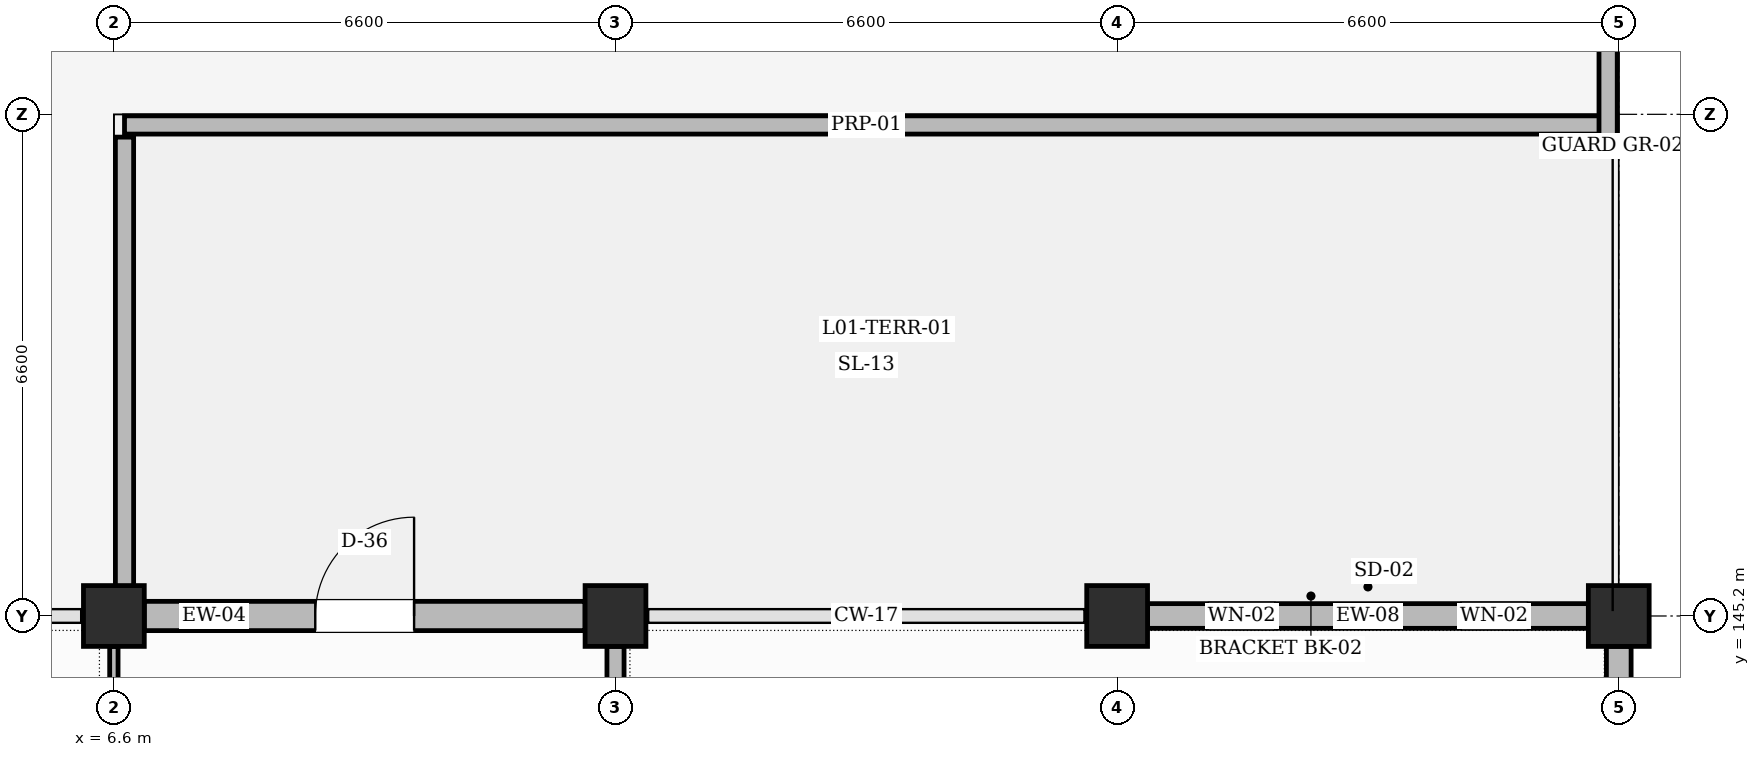
"""IFC4 building model, lengths in metres.
Left out: names, types, materials, properties, quantities, classifications, styles, units other than length and angle.
Written with IfcOpenShell. Run it as: python <this file> out.ifc"""

import sys

from ifc_helpers import new_model, si_unit, direction, frame, frame_2d, origin, origin_2d, place, context, subcontext, project, spatial, rectangle, extrude, element, fill, save


model = new_model("IFC4")
c1 = context("Model", 3, precision=1e-05, world=origin(), true_north=direction((0.0, 1.0)))
c2 = subcontext(c1, "Body", "Model", "MODEL_VIEW")
j1 = project(units=[si_unit("LENGTHUNIT", "METRE"), si_unit("PLANEANGLEUNIT", "RADIAN")], contexts=[c1])
p1 = place(None, origin())
s1 = spatial("IfcSite", under=j1, at=p1, CompositionType="ELEMENT")
p2 = place(p1, origin())
s2 = spatial("IfcBuilding", under=s1, at=p2, CompositionType="ELEMENT")
p3 = place(p2, frame((0.0, 0.0, 5.4)))
s3 = spatial("IfcBuildingStorey", under=s2, at=p3, CompositionType="ELEMENT", Elevation=5.4)
for number, where, z_axis, x_axis in (
    (1, (6.6, 145.2, 0.0), (0.0, 0.0, 1.0), (1.0, 0.0, 0.0)),
    (2, (13.2, 145.2, 0.0), (0.0, 0.0, 1.0), (1.0, 0.0, 0.0)),
    (3, (19.8, 145.2, 0.0), (0.0, 0.0, 1.0), (1.0, 0.0, 0.0)),
    (4, (26.4, 145.2, 0.0), (0.0, 0.0, 1.0), (1.0, 0.0, 0.0)),
):
    element("IfcColumn", number, at=place(p3, frame(where, z_axis=z_axis, x_axis=x_axis)), inside=s3, PredefinedType="COLUMN", context=c2, shape_type="SweptSolid", body=[
        extrude(rectangle(XDim=0.8, YDim=0.8, at=origin_2d()), origin(), (0.0, 0.0, 1.0), 4.8),
    ])
p4 = place(p3, frame((7.0, 145.2, 0.0), z_axis=(0.0, 0.0, 1.0), x_axis=(1.0, 0.0, 0.0)))
e5 = element("IfcWall", 5, at=p4, inside=s3, PredefinedType="SOLIDWALL", context=c2, shape_type="SweptSolid", body=[
    extrude(rectangle(XDim=5.8, YDim=0.385, at=frame_2d((2.9, 0.0))), origin(), (0.0, 0.0, 1.0), 3.85),
])
p5 = place(p4, frame((2.25, 0.0, 0.0)))
e6 = element("IfcOpeningElement", 6, at=p5, cuts=e5, PredefinedType="OPENING", context=c2, shape_type="SweptSolid", body=[
    extrude(rectangle(XDim=1.3, YDim=2.2, at=frame_2d((0.65, 1.1))), frame((0.0, 0.202, 0.0), z_axis=(0.0, -1.0, 0.0), x_axis=(1.0, 0.0, 0.0)), (0.0, 0.0, 1.0), 0.405),
])
p6 = place(p3, frame((20.2, 145.2, 0.0), z_axis=(0.0, 0.0, 1.0), x_axis=(1.0, 0.0, 0.0)))
e7 = element("IfcWall", 7, at=p6, inside=s3, PredefinedType="SOLIDWALL", context=c2, shape_type="SweptSolid", body=[
    extrude(rectangle(XDim=5.8, YDim=0.325, at=frame_2d((2.9, 0.0))), origin(), (0.0, 0.0, 1.0), 3.85),
])
p7 = place(p6, frame((0.8, 0.0, 0.95)))
e8 = element("IfcOpeningElement", 8, at=p7, cuts=e7, PredefinedType="OPENING", context=c2, shape_type="SweptSolid", body=[
    extrude(rectangle(XDim=0.88, YDim=1.52, at=frame_2d((0.44, 0.76))), frame((0.0, 0.172, 0.0), z_axis=(0.0, -1.0, 0.0), x_axis=(1.0, 0.0, 0.0)), (0.0, 0.0, 1.0), 0.345),
])
p8 = place(p6, frame((4.12, 0.0, 0.95)))
e9 = element("IfcOpeningElement", 9, at=p8, cuts=e7, PredefinedType="OPENING", context=c2, shape_type="SweptSolid", body=[
    extrude(rectangle(XDim=0.88, YDim=1.52, at=frame_2d((0.44, 0.76))), frame((0.0, 0.172, 0.0), z_axis=(0.0, -1.0, 0.0), x_axis=(1.0, 0.0, 0.0)), (0.0, 0.0, 1.0), 0.345),
])
p9 = place(p3, frame((26.4, 138.9, 0.0), z_axis=(0.0, 0.0, 1.0), x_axis=(0.0, 1.0, 0.0)))
e10 = element("IfcWall", 10, at=p9, inside=s3, PredefinedType="SOLIDWALL", context=c2, shape_type="SweptSolid", body=[
    extrude(rectangle(XDim=5.9, YDim=0.325, at=frame_2d((2.95, 0.0))), origin(), (0.0, 0.0, 1.0), 3.85),
])
p10 = place(p9, frame((0.8, 0.0, 0.95)))
e11 = element("IfcOpeningElement", 11, at=p10, cuts=e10, PredefinedType="OPENING", context=c2, shape_type="SweptSolid", body=[
    extrude(rectangle(XDim=0.88, YDim=1.74, at=frame_2d((0.44, 0.87))), frame((0.0, 0.172, 0.0), z_axis=(0.0, -1.0, 0.0), x_axis=(1.0, 0.0, 0.0)), (0.0, 0.0, 1.0), 0.345),
])
p11 = place(p9, frame((4.22, 0.0, 0.95)))
e12 = element("IfcOpeningElement", 12, at=p11, cuts=e10, PredefinedType="OPENING", context=c2, shape_type="SweptSolid", body=[
    extrude(rectangle(XDim=0.88, YDim=1.74, at=frame_2d((0.44, 0.87))), frame((0.0, 0.172, 0.0), z_axis=(0.0, -1.0, 0.0), x_axis=(1.0, 0.0, 0.0)), (0.0, 0.0, 1.0), 0.345),
])
p12 = place(p3, frame((6.74, 151.66, 0.0), z_axis=(0.0, 0.0, 1.0), x_axis=(1.0, 0.0, 0.0)))
e13 = element("IfcWall", 13, at=p12, inside=s3, PredefinedType="PARAPET", context=c2, shape_type="SweptSolid", body=[
    extrude(rectangle(XDim=6.32, YDim=0.24, at=frame_2d((3.16, 0.0))), origin(), (0.0, 0.0, 1.0), 1.15),
])
p13 = place(p3, frame((6.74, 145.5, 0.0), z_axis=(0.0, 0.0, 1.0), x_axis=(0.0, 1.0, 0.0)))
e14 = element("IfcWall", 14, at=p13, inside=s3, PredefinedType="PARAPET", context=c2, shape_type="SweptSolid", body=[
    extrude(rectangle(XDim=6.0, YDim=0.24, at=frame_2d((3.0, 0.0))), origin(), (0.0, 0.0, 1.0), 1.15),
])
p14 = place(p3, frame((13.34, 151.66, 0.0), z_axis=(0.0, 0.0, 1.0), x_axis=(1.0, 0.0, 0.0)))
e15 = element("IfcWall", 15, at=p14, inside=s3, PredefinedType="PARAPET", context=c2, shape_type="SweptSolid", body=[
    extrude(rectangle(XDim=6.32, YDim=0.24, at=frame_2d((3.16, 0.0))), origin(), (0.0, 0.0, 1.0), 1.15),
])
p15 = place(p3, frame((19.94, 151.66, 0.0), z_axis=(0.0, 0.0, 1.0), x_axis=(1.0, 0.0, 0.0)))
e16 = element("IfcWall", 16, at=p15, inside=s3, PredefinedType="PARAPET", context=c2, shape_type="SweptSolid", body=[
    extrude(rectangle(XDim=6.32, YDim=0.24, at=frame_2d((3.16, 0.0))), origin(), (0.0, 0.0, 1.0), 1.15),
])
p16 = place(p3, frame((26.26, 151.36, 0.0), z_axis=(0.0, 0.0, 1.0), x_axis=(0.0, 1.0, 0.0)))
e17 = element("IfcWall", 17, at=p16, inside=s3, PredefinedType="PARAPET", context=c2, shape_type="SweptSolid", body=[
    extrude(rectangle(XDim=0.16, YDim=0.24, at=frame_2d((0.08, 0.0))), origin(), (0.0, 0.0, 1.0), 1.15),
])
p17 = place(p3, frame((26.26, 152.1, 0.0), z_axis=(0.0, 0.0, 1.0), x_axis=(0.0, 1.0, 0.0)))
e18 = element("IfcWall", 18, at=p17, inside=s3, PredefinedType="PARAPET", context=c2, shape_type="SweptSolid", body=[
    extrude(rectangle(XDim=6.0, YDim=0.24, at=frame_2d((3.0, 0.0))), origin(), (0.0, 0.0, 1.0), 1.15),
])
p18 = place(p3, frame((6.6, 138.9, 0.0), z_axis=(0.0, 0.0, 1.0), x_axis=(0.0, 1.0, 0.0)))
e19 = element("IfcWall", 19, at=p18, inside=s3, PredefinedType="PARTITIONING", context=c2, shape_type="SweptSolid", body=[
    extrude(rectangle(XDim=5.9, YDim=0.11, at=frame_2d((2.95, 0.0))), origin(), (0.0, 0.0, 1.0), 3.7),
])
p19 = place(p18, frame((2.375, 0.0, 0.0)))
e20 = element("IfcOpeningElement", 20, at=p19, cuts=e19, PredefinedType="OPENING", context=c2, shape_type="SweptSolid", body=[
    extrude(rectangle(XDim=1.25, YDim=2.25, at=frame_2d((0.625, 1.125))), frame((0.0, 0.065, 0.0), z_axis=(0.0, -1.0, 0.0), x_axis=(1.0, 0.0, 0.0)), (0.0, 0.0, 1.0), 0.13),
])
p20 = place(p3, frame((13.2, 138.9, 0.0), z_axis=(0.0, 0.0, 1.0), x_axis=(0.0, 1.0, 0.0)))
e21 = element("IfcWall", 21, at=p20, inside=s3, PredefinedType="PARTITIONING", context=c2, shape_type="SweptSolid", body=[
    extrude(rectangle(XDim=5.9, YDim=0.225, at=frame_2d((2.95, 0.0))), origin(), (0.0, 0.0, 1.0), 3.7),
])
p21 = place(p5, origin())
e22 = element("IfcDoor", 22, at=p21, inside=s3, OperationType="SINGLE_SWING_RIGHT", PredefinedType="DOOR", context=c2, shape_type="SweptSolid", body=[
    extrude(rectangle(XDim=1.3, YDim=2.2, at=frame_2d((0.65, 1.1))), frame((0.0, 0.025, 0.0), z_axis=(0.0, -1.0, 0.0), x_axis=(1.0, 0.0, 0.0)), (0.0, 0.0, 1.0), 0.05),
])
fill(e6, e22)
p22 = place(p7, origin())
e23 = element("IfcWindow", 23, at=p22, inside=s3, PartitioningType="SINGLE_PANEL", PredefinedType="WINDOW", context=c2, shape_type="SweptSolid", body=[
    extrude(rectangle(XDim=0.88, YDim=1.52, at=frame_2d((0.44, 0.76))), frame((0.0, 0.03, 0.0), z_axis=(0.0, -1.0, 0.0), x_axis=(1.0, 0.0, 0.0)), (0.0, 0.0, 1.0), 0.06),
])
fill(e8, e23)
p23 = place(p8, origin())
e24 = element("IfcWindow", 24, at=p23, inside=s3, PartitioningType="SINGLE_PANEL", PredefinedType="WINDOW", context=c2, shape_type="SweptSolid", body=[
    extrude(rectangle(XDim=0.88, YDim=1.52, at=frame_2d((0.44, 0.76))), frame((0.0, 0.03, 0.0), z_axis=(0.0, -1.0, 0.0), x_axis=(1.0, 0.0, 0.0)), (0.0, 0.0, 1.0), 0.06),
])
fill(e9, e24)
save(model, sys.argv[1])
